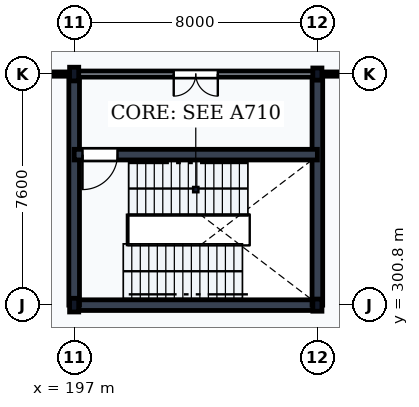
"""IFC4 building model, lengths in metres.
Left out: names, types, materials, properties, quantities, classifications, styles, units other than length and angle.
Written with IfcOpenShell. Run it as: python <this file> out.ifc"""

import sys

from ifc_helpers import new_model, si_unit, direction, frame, frame_2d, origin, origin_2d, place, context, subcontext, project, spatial, rectangle, i_section, extrude, element, fill, save


model = new_model("IFC4")
c1 = context("Model", 3, precision=1e-05, world=origin(), true_north=direction((0.0, 1.0)))
c2 = subcontext(c1, "Body", "Model", "MODEL_VIEW")
j1 = project(units=[si_unit("LENGTHUNIT", "METRE"), si_unit("PLANEANGLEUNIT", "RADIAN")], contexts=[c1])
p1 = place(None, origin())
s1 = spatial("IfcSite", under=j1, at=p1, CompositionType="ELEMENT")
p2 = place(p1, origin())
s2 = spatial("IfcBuilding", under=s1, at=p2, CompositionType="ELEMENT")
p3 = place(p2, frame((0.0, 0.0, 5.4)))
s3 = spatial("IfcBuildingStorey", under=s2, at=p3, CompositionType="ELEMENT", Elevation=5.4)
for number, where, z_axis, x_axis in (
    (1, (197.0, 300.8, 0.0), (0.0, 0.0, 1.0), (1.0, 0.0, 0.0)),
    (2, (197.0, 308.4, 0.0), (0.0, 0.0, 1.0), (1.0, 0.0, 0.0)),
):
    element("IfcColumn", number, at=place(p3, frame(where, z_axis=z_axis, x_axis=x_axis)), inside=s3, PredefinedType="COLUMN", context=c2, shape_type="SweptSolid", body=[
        extrude(i_section(OverallWidth=0.3, OverallDepth=0.45, WebThickness=0.014, FlangeThickness=0.026, FilletRadius=0.027, at=origin_2d()), origin(), (0.0, 0.0, 1.0), 5.1),
    ])
for number, where, z_axis, x_axis in (
    (3, (205.0, 300.8, 0.0), (0.0, 0.0, 1.0), (1.0, 0.0, 0.0)),
    (4, (205.0, 308.4, 0.0), (0.0, 0.0, 1.0), (1.0, 0.0, 0.0)),
):
    element("IfcColumn", number, at=place(p3, frame(where, z_axis=z_axis, x_axis=x_axis)), inside=s3, PredefinedType="COLUMN", context=c2, shape_type="SweptSolid", body=[
        extrude(i_section(OverallWidth=0.3, OverallDepth=0.4, WebThickness=0.013, FlangeThickness=0.024, FilletRadius=0.027, at=origin_2d()), origin(), (0.0, 0.0, 1.0), 5.1),
    ])
p4 = place(p3, frame((197.0, 300.8, 0.0), z_axis=(0.0, 0.0, 1.0), x_axis=(1.0, 0.0, 0.0)))
e5 = element("IfcWall", 5, at=p4, inside=s3, PredefinedType="SHEAR", context=c2, shape_type="SweptSolid", body=[
    extrude(rectangle(XDim=8.0, YDim=0.35, at=frame_2d((4.0, 0.0))), origin(), (0.0, 0.0, 1.0), 4.86),
])
for number, where, z_axis, x_axis in (
    (6, (197.0, 300.8, 0.0), (0.0, 0.0, 1.0), (0.0, 1.0, 0.0)),
    (7, (205.0, 300.8, 0.0), (0.0, 0.0, 1.0), (0.0, 1.0, 0.0)),
):
    element("IfcWall", number, at=place(p3, frame(where, z_axis=z_axis, x_axis=x_axis)), inside=s3, PredefinedType="SHEAR", context=c2, shape_type="SweptSolid", body=[
        extrude(rectangle(XDim=7.6, YDim=0.35, at=frame_2d((3.8, 0.0))), origin(), (0.0, 0.0, 1.0), 4.86),
    ])
p5 = place(p3, frame((197.0, 305.75, 0.0), z_axis=(0.0, 0.0, 1.0), x_axis=(1.0, 0.0, 0.0)))
e8 = element("IfcWall", 8, at=p5, inside=s3, PredefinedType="SHEAR", context=c2, shape_type="SweptSolid", body=[
    extrude(rectangle(XDim=8.0, YDim=0.35, at=frame_2d((4.0, 0.0))), origin(), (0.0, 0.0, 1.0), 4.86),
])
p6 = place(p5, frame((0.275, 0.0, 0.0)))
e9 = element("IfcOpeningElement", 9, at=p6, cuts=e8, PredefinedType="OPENING", context=c2, shape_type="SweptSolid", body=[
    extrude(rectangle(XDim=1.15, YDim=2.15, at=frame_2d((0.575, 1.075))), frame((0.0, 0.19, 0.0), z_axis=(0.0, -1.0, 0.0), x_axis=(1.0, 0.0, 0.0)), (0.0, 0.0, 1.0), 0.38),
])
p7 = place(p3, frame((197.0, 308.4, 0.0), z_axis=(0.0, 0.0, 1.0), x_axis=(1.0, 0.0, 0.0)))
e10 = element("IfcWall", 10, at=p7, inside=s3, PredefinedType="PARTITIONING", context=c2, shape_type="SweptSolid", body=[
    extrude(rectangle(XDim=8.0, YDim=0.2, at=frame_2d((4.0, 0.0))), origin(), (0.0, 0.0, 1.0), 4.408),
])
p8 = place(p7, frame((3.275, 0.0, 0.0)))
e11 = element("IfcOpeningElement", 11, at=p8, cuts=e10, PredefinedType="OPENING", context=c2, shape_type="SweptSolid", body=[
    extrude(rectangle(XDim=1.45, YDim=2.2, at=frame_2d((0.725, 1.1))), frame((0.0, 0.115, 0.0), z_axis=(0.0, -1.0, 0.0), x_axis=(1.0, 0.0, 0.0)), (0.0, 0.0, 1.0), 0.23),
])
p9 = place(p3, frame((165.0, 308.4, 0.0), z_axis=(0.0, 0.0, 1.0), x_axis=(1.0, 0.0, 0.0)))
e12 = element("IfcWall", 12, at=p9, inside=s3, PredefinedType="PARTITIONING", context=c2, shape_type="SweptSolid", body=[
    extrude(rectangle(XDim=32.0, YDim=0.14, at=frame_2d((16.0, 0.0))), origin(), (0.0, 0.0, 1.0), 4.408),
])
p10 = place(p9, frame((16.6, 0.0, 0.0)))
e13 = element("IfcOpeningElement", 13, at=p10, cuts=e12, PredefinedType="OPENING", context=c2, shape_type="SweptSolid", body=[
    extrude(rectangle(XDim=1.8, YDim=2.4, at=frame_2d((0.9, 1.2))), frame((0.0, 0.085, 0.0), z_axis=(0.0, -1.0, 0.0), x_axis=(1.0, 0.0, 0.0)), (0.0, 0.0, 1.0), 0.17),
])
p11 = place(p3, frame((205.0, 308.4, 0.0), z_axis=(0.0, 0.0, 1.0), x_axis=(1.0, 0.0, 0.0)))
e14 = element("IfcWall", 14, at=p11, inside=s3, PredefinedType="PARTITIONING", context=c2, shape_type="SweptSolid", body=[
    extrude(rectangle(XDim=41.0, YDim=0.14, at=frame_2d((20.5, 0.0))), origin(), (0.0, 0.0, 1.0), 4.308),
])
p12 = place(p11, frame((21.66, 0.0, 0.0)))
e15 = element("IfcOpeningElement", 15, at=p12, cuts=e14, PredefinedType="OPENING", context=c2, shape_type="SweptSolid", body=[
    extrude(rectangle(XDim=1.8, YDim=2.4, at=frame_2d((0.9, 1.2))), frame((0.0, 0.085, 0.0), z_axis=(0.0, -1.0, 0.0), x_axis=(1.0, 0.0, 0.0)), (0.0, 0.0, 1.0), 0.17),
])
p13 = place(p6, frame((1.15, 0.0, 0.0), z_axis=(0.0, 0.0, 1.0), x_axis=(-1.0, 0.0, 0.0)))
e16 = element("IfcDoor", 16, at=p13, inside=s3, OperationType="SINGLE_SWING_RIGHT", PredefinedType="DOOR", context=c2, shape_type="SweptSolid", body=[
    extrude(rectangle(XDim=1.15, YDim=2.15, at=frame_2d((0.575, 1.075))), frame((0.0, 0.025, 0.0), z_axis=(0.0, -1.0, 0.0), x_axis=(1.0, 0.0, 0.0)), (0.0, 0.0, 1.0), 0.05),
])
fill(e9, e16)
p14 = place(p8, frame((1.45, 0.0, 0.0), z_axis=(0.0, 0.0, 1.0), x_axis=(-1.0, 0.0, 0.0)))
e17 = element("IfcDoor", 17, at=p14, inside=s3, OperationType="DOUBLE_DOOR_SINGLE_SWING", PredefinedType="DOOR", context=c2, shape_type="SweptSolid", body=[
    extrude(rectangle(XDim=1.45, YDim=2.2, at=frame_2d((0.725, 1.1))), frame((0.0, 0.025, 0.0), z_axis=(0.0, -1.0, 0.0), x_axis=(1.0, 0.0, 0.0)), (0.0, 0.0, 1.0), 0.05),
])
fill(e11, e17)
save(model, sys.argv[1])
